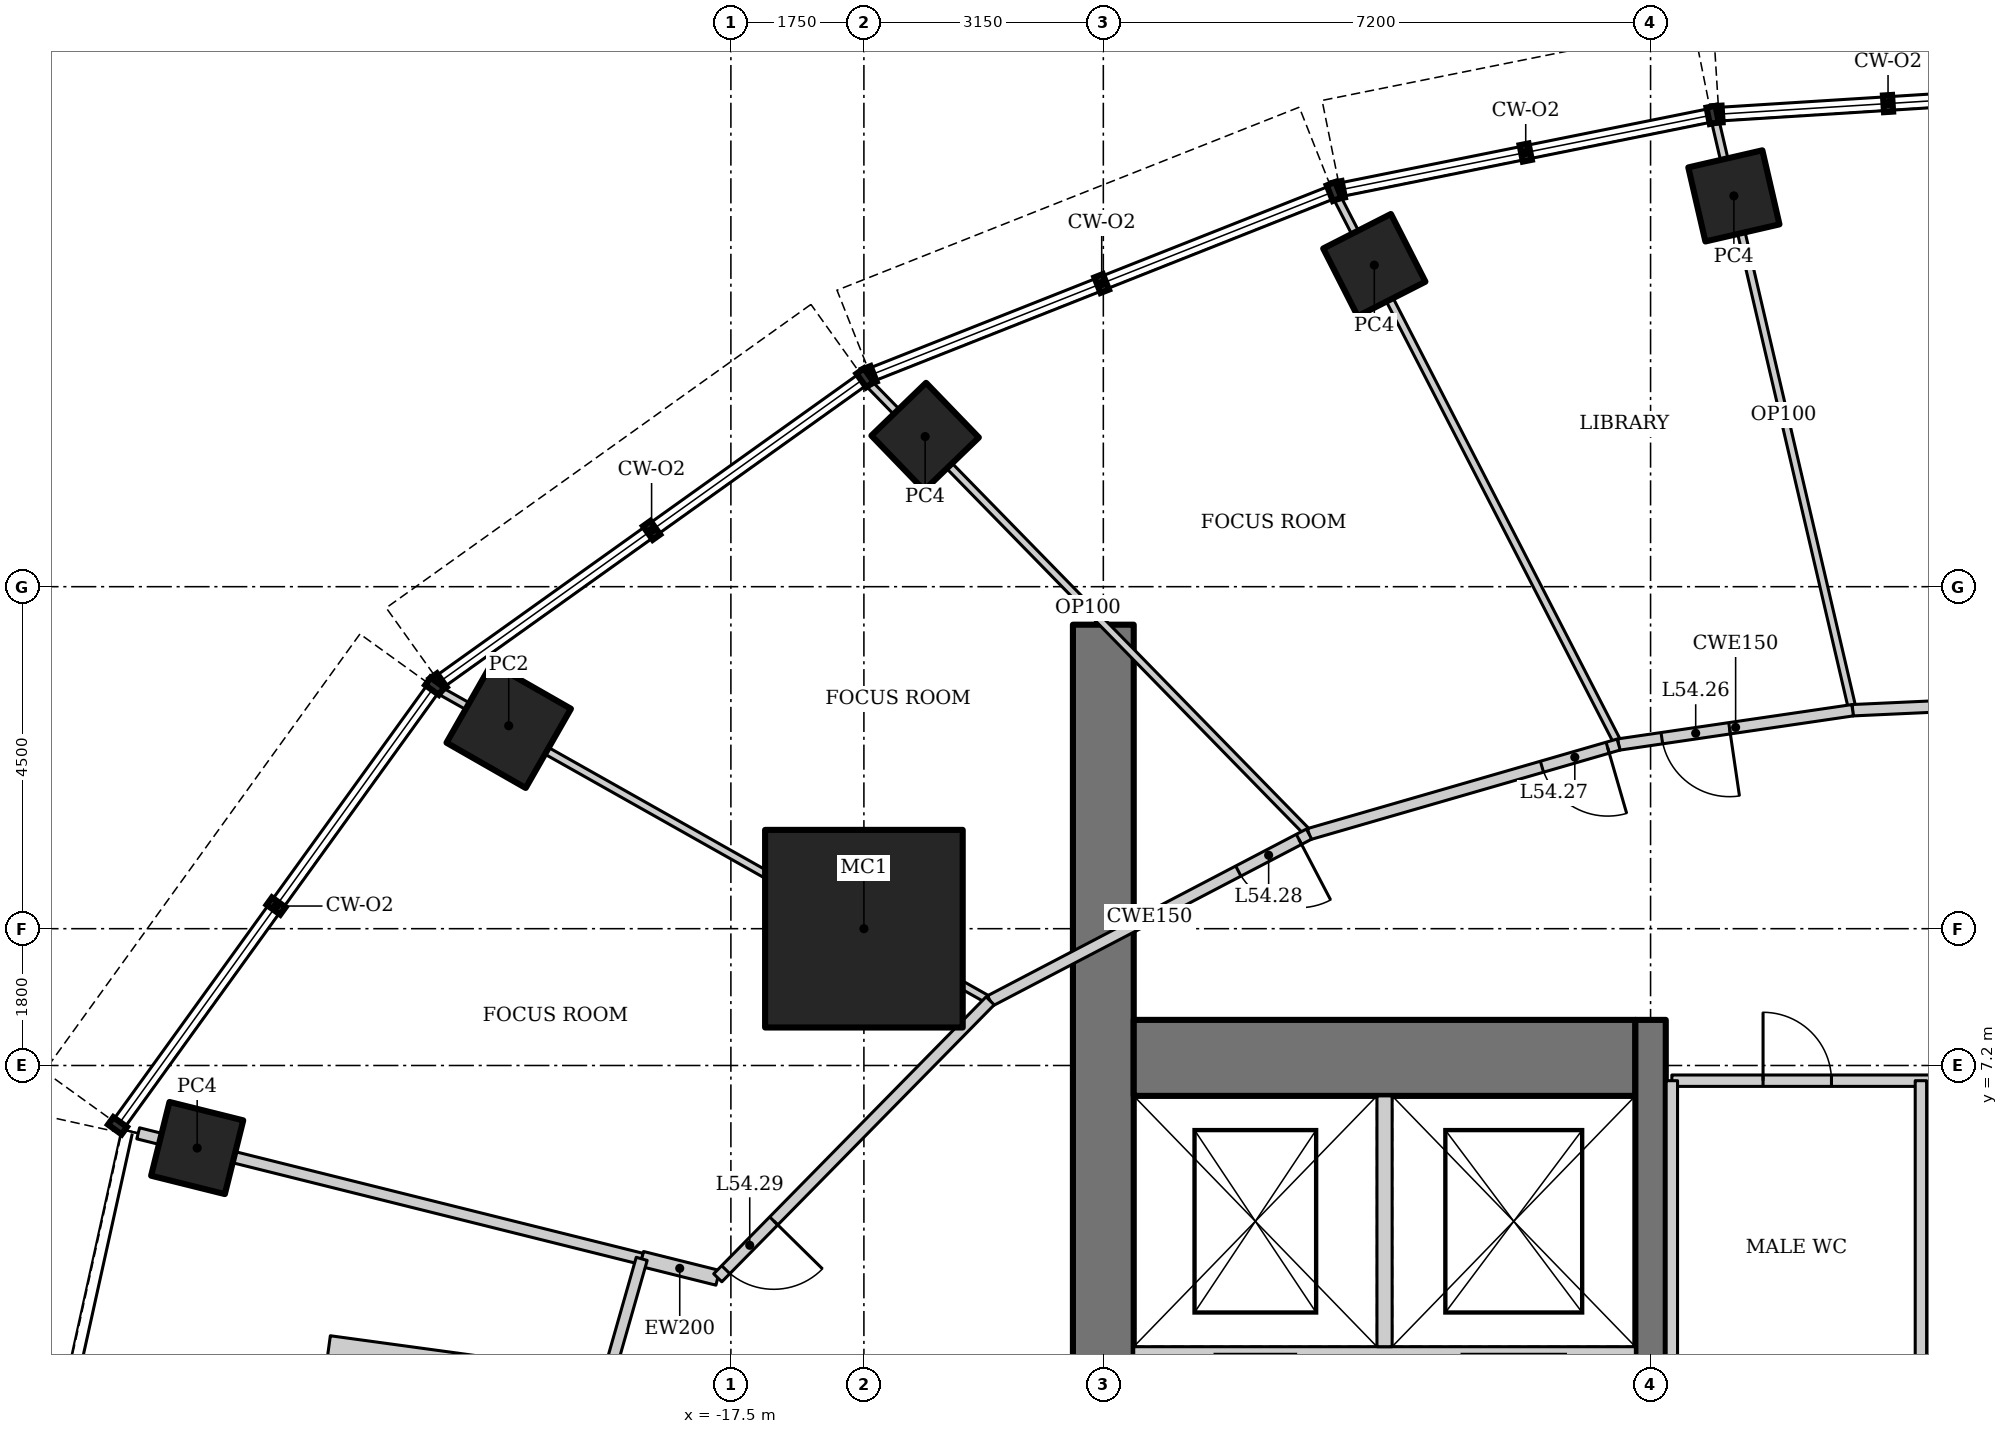
"""IFC4 building model, lengths in metres.
Left out: names, types, materials, properties, quantities, classifications, styles, units other than length and angle.
Written with IfcOpenShell. Run it as: python <this file> out.ifc"""

import sys

from ifc_helpers import new_model, si_unit, direction, frame, frame_2d, origin, origin_2d, place, context, subcontext, project, spatial, rectangle, hollow_rectangle, extrude, element, fill, save


model = new_model("IFC4")
c1 = context("Model", 3, precision=1e-05, world=origin(), true_north=direction((0.0, 1.0)))
c2 = subcontext(c1, "Body", "Model", "MODEL_VIEW")
j1 = project(units=[si_unit("LENGTHUNIT", "METRE"), si_unit("PLANEANGLEUNIT", "RADIAN")], contexts=[c1])
p1 = place(None, origin())
s1 = spatial("IfcSite", under=j1, at=p1, CompositionType="ELEMENT")
p2 = place(p1, origin())
s2 = spatial("IfcBuilding", under=s1, at=p2, CompositionType="ELEMENT")
p3 = place(p2, frame((0.0, 0.0, 232.6)))
s3 = spatial("IfcBuildingStorey", under=s2, at=p3, CompositionType="ELEMENT", Elevation=232.6)
p4 = place(p3, frame((-15.75, 9.0, 0.0), z_axis=(0.0, 0.0, 1.0), x_axis=(1.0, 0.0, 0.0)))
e1 = element("IfcColumn", 1, at=p4, inside=s3, PredefinedType="COLUMN", context=c2, shape_type="SweptSolid", body=[
    extrude(hollow_rectangle(XDim=2.6, YDim=2.6, WallThickness=0.13, at=origin_2d()), origin(), (0.0, 0.0, 1.0), 4.2),
])
for number, where, z_axis, x_axis in (
    (2, (-4.304, 18.642, 0.0), (0.0, 0.0, 1.0), (0.974, 0.225, 0.0)),
    (3, (-9.035, 17.731, 0.0), (0.0, 0.0, 1.0), (0.891, 0.454, 0.0)),
    (4, (-14.944, 15.475, 0.0), (0.0, 0.0, 1.0), (0.719, 0.695, 0.0)),
):
    element("IfcColumn", number, at=place(p3, frame(where, z_axis=z_axis, x_axis=x_axis)), inside=s3, PredefinedType="COLUMN", context=c2, shape_type="SweptSolid", body=[
        extrude(hollow_rectangle(XDim=1.0, YDim=1.0, WallThickness=0.08, at=origin_2d()), origin(), (0.0, 0.0, 1.0), 4.2),
    ])
p5 = place(p3, frame((-20.423, 11.67, 0.0), z_axis=(0.0, 0.0, 1.0), x_axis=(0.496139221777, 0.86824298017, 0.0)))
e5 = element("IfcColumn", 5, at=p5, inside=s3, PredefinedType="COLUMN", context=c2, shape_type="SweptSolid", body=[
    extrude(hollow_rectangle(XDim=1.2, YDim=1.2, WallThickness=0.1, at=origin_2d()), origin(), (0.0, 0.0, 1.0), 4.2),
])
p6 = place(p3, frame((-24.522, 6.114, 0.0), z_axis=(0.0, 0.0, 1.0), x_axis=(0.2419218956, 0.970295726276, 0.0)))
e6 = element("IfcColumn", 6, at=p6, inside=s3, PredefinedType="COLUMN", context=c2, shape_type="SweptSolid", body=[
    extrude(hollow_rectangle(XDim=1.0, YDim=1.0, WallThickness=0.08, at=origin_2d()), origin(), (0.0, 0.0, 1.0), 4.2),
])
p7 = place(p3, frame((-12.6, 13.0, 0.0), z_axis=(0.0, 0.0, 1.0), x_axis=(0.0, -1.0, 0.0)))
e7 = element("IfcWall", 7, at=p7, inside=s3, PredefinedType="SHEAR", context=c2, shape_type="SweptSolid", body=[
    extrude(rectangle(XDim=26.0, YDim=0.8, at=frame_2d((13.0, 0.0))), origin(), (0.0, 0.0, 1.0), 4.2),
])
p8 = place(p7, frame((12.1, 0.0, 0.0)))
e8 = element("IfcOpeningElement", 8, at=p8, cuts=e7, PredefinedType="OPENING", context=c2, shape_type="SweptSolid", body=[
    extrude(rectangle(XDim=1.8, YDim=2.1, at=frame_2d((0.9, 1.05))), frame((0.0, 0.41, 0.0), z_axis=(0.0, -1.0, 0.0), x_axis=(1.0, 0.0, 0.0)), (0.0, 0.0, 1.0), 0.82),
])
p9 = place(p3, frame((-5.6, 7.3, 0.0), z_axis=(0.0, 0.0, 1.0), x_axis=(-1.0, 0.0, 0.0)))
e9 = element("IfcWall", 9, at=p9, inside=s3, PredefinedType="SHEAR", context=c2, shape_type="SweptSolid", body=[
    extrude(rectangle(XDim=6.6, YDim=1.0, at=frame_2d((3.3, 0.0))), origin(), (0.0, 0.0, 1.0), 4.2),
])
p10 = place(p3, frame((-5.4, 7.8, 0.0), z_axis=(0.0, 0.0, 1.0), x_axis=(0.0, -1.0, 0.0)))
e10 = element("IfcWall", 10, at=p10, inside=s3, PredefinedType="SHEAR", context=c2, shape_type="SweptSolid", body=[
    extrude(rectangle(XDim=14.6, YDim=0.4, at=frame_2d((7.3, 0.0))), origin(), (0.0, 0.0, 1.0), 4.2),
])
p11 = place(p10, frame((6.4, 0.0, 0.0)))
e11 = element("IfcOpeningElement", 11, at=p11, cuts=e10, PredefinedType="OPENING", context=c2, shape_type="SweptSolid", body=[
    extrude(rectangle(XDim=1.8, YDim=2.1, at=frame_2d((0.9, 1.05))), frame((0.0, 0.21, 0.0), z_axis=(0.0, -1.0, 0.0), x_axis=(1.0, 0.0, 0.0)), (0.0, 0.0, 1.0), 0.42),
])
p12 = place(p3, frame((-12.2, 3.4, 0.0), z_axis=(0.0, 0.0, 1.0), x_axis=(1.0, 0.0, 0.0)))
e12 = element("IfcWall", 12, at=p12, inside=s3, PredefinedType="SOLIDWALL", context=c2, shape_type="SweptSolid", body=[
    extrude(rectangle(XDim=6.6, YDim=0.2, at=frame_2d((3.3, 0.0))), origin(), (0.0, 0.0, 1.0), 4.2),
])
p13 = place(p12, frame((1.05, 0.0, 0.0)))
e13 = element("IfcOpeningElement", 13, at=p13, cuts=e12, PredefinedType="OPENING", context=c2, shape_type="SweptSolid", body=[
    extrude(rectangle(XDim=1.1, YDim=2.2, at=frame_2d((0.55, 1.1))), frame((0.0, 0.11, 0.0), z_axis=(0.0, -1.0, 0.0), x_axis=(1.0, 0.0, 0.0)), (0.0, 0.0, 1.0), 0.22),
])
p14 = place(p12, frame((4.3, 0.0, 0.0)))
e14 = element("IfcOpeningElement", 14, at=p14, cuts=e12, PredefinedType="OPENING", context=c2, shape_type="SweptSolid", body=[
    extrude(rectangle(XDim=1.4, YDim=2.2, at=frame_2d((0.7, 1.1))), frame((0.0, 0.11, 0.0), z_axis=(0.0, -1.0, 0.0), x_axis=(1.0, 0.0, 0.0)), (0.0, 0.0, 1.0), 0.22),
])
p15 = place(p3, frame((-8.9, 3.5, 0.0), z_axis=(0.0, 0.0, 1.0), x_axis=(0.0, 1.0, 0.0)))
e15 = element("IfcWall", 15, at=p15, inside=s3, PredefinedType="SOLIDWALL", context=c2, shape_type="SweptSolid", body=[
    extrude(rectangle(XDim=3.3, YDim=0.2, at=frame_2d((1.65, 0.0))), origin(), (0.0, 0.0, 1.0), 4.2),
])
p16 = place(p3, frame((-20.941, 2.789, 0.0), z_axis=(0.0, 0.0, 1.0), x_axis=(-0.990807029325, 0.135282780276, 0.0)))
e16 = element("IfcWall", 16, at=p16, inside=s3, PredefinedType="USERDEFINED", context=c2, shape_type="SweptSolid", body=[
    extrude(rectangle(XDim=1.927, YDim=1.2, at=frame_2d((0.964, 0.0))), origin(), (0.0, 0.0, 1.0), 0.9),
])
p17 = place(p3, frame((-18.673, 4.656, 0.0), z_axis=(0.0, 0.0, 1.0), x_axis=(-0.970293751158, 0.241929817229, 0.0)))
e17 = element("IfcWall", 17, at=p17, inside=s3, PredefinedType="ELEMENTEDWALL", context=c2, shape_type="SweptSolid", body=[
    extrude(rectangle(XDim=6.828, YDim=0.15, at=frame_2d((3.414, 0.0))), origin(), (0.0, 0.0, 1.0), 3.108),
])
p18 = place(p3, frame((-4.556, 19.657, 0.0), z_axis=(0.0, 0.0, 1.0), x_axis=(0.227034513848, -0.973886712879, 0.0)))
e18 = element("IfcWall", 18, at=p18, inside=s3, PredefinedType="PARTITIONING", context=c2, shape_type="SweptSolid", body=[
    extrude(rectangle(XDim=7.991, YDim=0.1, at=frame_2d((3.996, 0.0))), origin(), (0.0, 0.0, 1.0), 3.108),
])
p19 = place(p3, frame((-9.539, 18.65, 0.0), z_axis=(0.0, 0.0, 1.0), x_axis=(0.457552286462, -0.88918271753, 0.0)))
e19 = element("IfcWall", 19, at=p19, inside=s3, PredefinedType="PARTITIONING", context=c2, shape_type="SweptSolid", body=[
    extrude(rectangle(XDim=8.128, YDim=0.1, at=frame_2d((4.064, 0.0))), origin(), (0.0, 0.0, 1.0), 3.108),
])
p20 = place(p3, frame((-15.709, 16.199, 0.0), z_axis=(0.0, 0.0, 1.0), x_axis=(0.69875697861, -0.715359129978, 0.0)))
e20 = element("IfcWall", 20, at=p20, inside=s3, PredefinedType="PARTITIONING", context=c2, shape_type="SweptSolid", body=[
    extrude(rectangle(XDim=8.323, YDim=0.1, at=frame_2d((4.162, 0.0))), origin(), (0.0, 0.0, 1.0), 3.41),
])
p21 = place(p3, frame((-21.358, 12.15, 0.0), z_axis=(0.0, 0.0, 1.0), x_axis=(0.871080529249, -0.491140215786, 0.0)))
e21 = element("IfcWall", 21, at=p21, inside=s3, PredefinedType="PARTITIONING", context=c2, shape_type="SweptSolid", body=[
    extrude(rectangle(XDim=8.345, YDim=0.1, at=frame_2d((4.173, 0.0))), origin(), (0.0, 0.0, 1.0), 3.524),
])
p22 = place(p3, frame((-18.673, 4.656, 0.0), z_axis=(0.0, 0.0, 1.0), x_axis=(0.970281616392, -0.241978480223, 0.0)))
e22 = element("IfcWall", 22, at=p22, inside=s3, PredefinedType="SOLIDWALL", context=c2, shape_type="SweptSolid", body=[
    extrude(rectangle(XDim=1.031, YDim=0.2, at=frame_2d((0.516, 0.0))), origin(), (0.0, 0.0, 1.0), 3.108),
])
p23 = place(p3, frame((0.0, 12.0, 0.0), z_axis=(0.0, 0.0, 1.0), x_axis=(-0.998953998629, -0.045726454297, 0.0)))
e23 = element("IfcWall", 23, at=p23, inside=s3, PredefinedType="PARTITIONING", context=c2, shape_type="SweptSolid", body=[
    extrude(rectangle(XDim=2.744, YDim=0.15, at=frame_2d((1.372, 0.0))), origin(), (0.0, 0.0, 1.0), 4.05),
])
p24 = place(p3, frame((-2.741, 11.875, 0.0), z_axis=(0.0, 0.0, 1.0), x_axis=(-0.989421822189, -0.145067080265, 0.0)))
e24 = element("IfcWall", 24, at=p24, inside=s3, PredefinedType="PARTITIONING", context=c2, shape_type="SweptSolid", body=[
    extrude(rectangle(XDim=3.112, YDim=0.15, at=frame_2d((1.556, 0.0))), origin(), (0.0, 0.0, 1.0), 4.05),
])
p25 = place(p24, frame((1.637, 0.0, 0.0)))
e25 = element("IfcOpeningElement", 25, at=p25, cuts=e24, PredefinedType="OPENING", context=c2, shape_type="SweptSolid", body=[
    extrude(rectangle(XDim=0.9, YDim=2.1, at=frame_2d((0.45, 1.05))), frame((0.0, 0.085, 0.0), z_axis=(0.0, -1.0, 0.0), x_axis=(1.0, 0.0, 0.0)), (0.0, 0.0, 1.0), 0.17),
])
p26 = place(p3, frame((-5.82, 11.423, 0.0), z_axis=(0.0, 0.0, 1.0), x_axis=(-0.960614838378, -0.27788330696, 0.0)))
e26 = element("IfcWall", 26, at=p26, inside=s3, PredefinedType="PARTITIONING", context=c2, shape_type="SweptSolid", body=[
    extrude(rectangle(XDim=4.24, YDim=0.15, at=frame_2d((2.12, 0.0))), origin(), (0.0, 0.0, 1.0), 4.05),
])
p27 = place(p26, frame((0.15, 0.0, 0.0)))
e27 = element("IfcOpeningElement", 27, at=p27, cuts=e26, PredefinedType="OPENING", context=c2, shape_type="SweptSolid", body=[
    extrude(rectangle(XDim=0.9, YDim=2.1, at=frame_2d((0.45, 1.05))), frame((0.0, 0.085, 0.0), z_axis=(0.0, -1.0, 0.0), x_axis=(1.0, 0.0, 0.0)), (0.0, 0.0, 1.0), 0.17),
])
p28 = place(p3, frame((-9.893, 10.245, 0.0), z_axis=(0.0, 0.0, 1.0), x_axis=(-0.886174439647, -0.463351769735, 0.0)))
e28 = element("IfcWall", 28, at=p28, inside=s3, PredefinedType="PARTITIONING", context=c2, shape_type="SweptSolid", body=[
    extrude(rectangle(XDim=4.735, YDim=0.15, at=frame_2d((2.367, 0.0))), origin(), (0.0, 0.0, 1.0), 4.05),
])
p29 = place(p28, frame((0.15, 0.0, 0.0)))
e29 = element("IfcOpeningElement", 29, at=p29, cuts=e28, PredefinedType="OPENING", context=c2, shape_type="SweptSolid", body=[
    extrude(rectangle(XDim=0.9, YDim=2.1, at=frame_2d((0.45, 1.05))), frame((0.0, 0.085, 0.0), z_axis=(0.0, -1.0, 0.0), x_axis=(1.0, 0.0, 0.0)), (0.0, 0.0, 1.0), 0.17),
])
p30 = place(p3, frame((-14.089, 8.051, 0.0), z_axis=(0.0, 0.0, 1.0), x_axis=(-0.701111216625, -0.713051934941, 0.0)))
e30 = element("IfcWall", 30, at=p30, inside=s3, PredefinedType="PARTITIONING", context=c2, shape_type="SweptSolid", body=[
    extrude(rectangle(XDim=5.112, YDim=0.15, at=frame_2d((2.556, 0.0))), origin(), (0.0, 0.0, 1.0), 4.05),
])
p31 = place(p30, frame((4.061, 0.0, 0.0)))
e31 = element("IfcOpeningElement", 31, at=p31, cuts=e30, PredefinedType="OPENING", context=c2, shape_type="SweptSolid", body=[
    extrude(rectangle(XDim=0.9, YDim=2.1, at=frame_2d((0.45, 1.05))), frame((0.0, 0.085, 0.0), z_axis=(0.0, -1.0, 0.0), x_axis=(1.0, 0.0, 0.0)), (0.0, 0.0, 1.0), 0.17),
])
p32 = place(p3, frame((-5.12, 7.0, 0.0), z_axis=(0.0, 0.0, 1.0), x_axis=(1.0, 0.0, 0.0)))
e32 = element("IfcWall", 32, at=p32, inside=s3, PredefinedType="SOLIDWALL", context=c2, shape_type="SweptSolid", body=[
    extrude(rectangle(XDim=10.24, YDim=0.15, at=frame_2d((5.12, 0.0))), origin(), (0.0, 0.0, 1.0), 4.05),
])
p33 = place(p32, frame((1.2, 0.0, 0.0)))
e33 = element("IfcOpeningElement", 33, at=p33, cuts=e32, PredefinedType="OPENING", context=c2, shape_type="SweptSolid", body=[
    extrude(rectangle(XDim=0.9, YDim=2.1, at=frame_2d((0.45, 1.05))), frame((0.0, 0.085, 0.0), z_axis=(0.0, -1.0, 0.0), x_axis=(1.0, 0.0, 0.0)), (0.0, 0.0, 1.0), 0.17),
])
p34 = place(p32, frame((4.477, 0.0, 0.0)))
e34 = element("IfcOpeningElement", 34, at=p34, cuts=e32, PredefinedType="OPENING", context=c2, shape_type="SweptSolid", body=[
    extrude(rectangle(XDim=0.9, YDim=2.1, at=frame_2d((0.45, 1.05))), frame((0.0, 0.085, 0.0), z_axis=(0.0, -1.0, 0.0), x_axis=(1.0, 0.0, 0.0)), (0.0, 0.0, 1.0), 0.17),
])
p35 = place(p32, frame((7.054, 0.0, 0.0)))
e35 = element("IfcOpeningElement", 35, at=p35, cuts=e32, PredefinedType="OPENING", context=c2, shape_type="SweptSolid", body=[
    extrude(rectangle(XDim=1.0, YDim=2.1, at=frame_2d((0.5, 1.05))), frame((0.0, 0.085, 0.0), z_axis=(0.0, -1.0, 0.0), x_axis=(1.0, 0.0, 0.0)), (0.0, 0.0, 1.0), 0.17),
])
p36 = place(p32, frame((8.952, 0.0, 0.0)))
e36 = element("IfcOpeningElement", 36, at=p36, cuts=e32, PredefinedType="OPENING", context=c2, shape_type="SweptSolid", body=[
    extrude(rectangle(XDim=0.9, YDim=2.1, at=frame_2d((0.45, 1.05))), frame((0.0, 0.085, 0.0), z_axis=(0.0, -1.0, 0.0), x_axis=(1.0, 0.0, 0.0)), (0.0, 0.0, 1.0), 0.17),
])
for number, where, z_axis, x_axis in (
    (37, (-5.12, 2.6, 0.0), (0.0, 0.0, 1.0), (0.0, 1.0, 0.0)),
    (38, (-1.843, 2.6, 0.0), (0.0, 0.0, 1.0), (0.0, 1.0, 0.0)),
):
    element("IfcWall", number, at=place(p3, frame(where, z_axis=z_axis, x_axis=x_axis)), inside=s3, PredefinedType="SOLIDWALL", context=c2, shape_type="SweptSolid", body=[
        extrude(rectangle(XDim=4.4, YDim=0.15, at=frame_2d((2.2, 0.0))), origin(), (0.0, 0.0, 1.0), 4.05),
    ])
p37 = place(p3, frame((-18.673, 4.656, 0.0), z_axis=(0.0, 0.0, 1.0), x_axis=(-0.274041669067, -0.961717819121, 0.0)))
e39 = element("IfcWall", 39, at=p37, inside=s3, PredefinedType="ELEMENTEDWALL", context=c2, shape_type="SweptSolid", body=[
    extrude(rectangle(XDim=4.841, YDim=0.15, at=frame_2d((2.42, 0.0))), origin(), (0.0, 0.0, 1.0), 4.05),
])
p38 = place(p37, frame((1.421, 0.0, 0.0)))
e40 = element("IfcOpeningElement", 40, at=p38, cuts=e39, PredefinedType="OPENING", context=c2, shape_type="SweptSolid", body=[
    extrude(rectangle(XDim=1.8, YDim=2.1, at=frame_2d((0.9, 1.05))), frame((0.0, 0.085, 0.0), z_axis=(0.0, -1.0, 0.0), x_axis=(1.0, 0.0, 0.0)), (0.0, 0.0, 1.0), 0.17),
])
p39 = place(p13, origin())
e41 = element("IfcDoor", 41, at=p39, inside=s3, OperationType="DOUBLE_DOOR_SLIDING", PredefinedType="DOOR", context=c2, shape_type="SweptSolid", body=[
    extrude(rectangle(XDim=1.1, YDim=2.2, at=frame_2d((0.55, 1.1))), frame((0.0, 0.025, 0.0), z_axis=(0.0, -1.0, 0.0), x_axis=(1.0, 0.0, 0.0)), (0.0, 0.0, 1.0), 0.05),
])
fill(e13, e41)
p40 = place(p14, origin())
e42 = element("IfcDoor", 42, at=p40, inside=s3, OperationType="DOUBLE_DOOR_SLIDING", PredefinedType="DOOR", context=c2, shape_type="SweptSolid", body=[
    extrude(rectangle(XDim=1.4, YDim=2.2, at=frame_2d((0.7, 1.1))), frame((0.0, 0.025, 0.0), z_axis=(0.0, -1.0, 0.0), x_axis=(1.0, 0.0, 0.0)), (0.0, 0.0, 1.0), 0.05),
])
fill(e14, e42)
p41 = place(p33, origin())
e43 = element("IfcDoor", 43, at=p41, inside=s3, OperationType="SINGLE_SWING_LEFT", PredefinedType="DOOR", context=c2, shape_type="SweptSolid", body=[
    extrude(rectangle(XDim=0.9, YDim=2.1, at=frame_2d((0.45, 1.05))), frame((0.0, 0.025, 0.0), z_axis=(0.0, -1.0, 0.0), x_axis=(1.0, 0.0, 0.0)), (0.0, 0.0, 1.0), 0.05),
])
fill(e33, e43)
p42 = place(p25, origin())
e44 = element("IfcDoor", 44, at=p42, inside=s3, OperationType="SINGLE_SWING_LEFT", PredefinedType="DOOR", context=c2, shape_type="SweptSolid", body=[
    extrude(rectangle(XDim=0.9, YDim=2.1, at=frame_2d((0.45, 1.05))), frame((0.0, 0.025, 0.0), z_axis=(0.0, -1.0, 0.0), x_axis=(1.0, 0.0, 0.0)), (0.0, 0.0, 1.0), 0.05),
])
fill(e25, e44)
p43 = place(p27, origin())
e45 = element("IfcDoor", 45, at=p43, inside=s3, OperationType="SINGLE_SWING_LEFT", PredefinedType="DOOR", context=c2, shape_type="SweptSolid", body=[
    extrude(rectangle(XDim=0.9, YDim=2.1, at=frame_2d((0.45, 1.05))), frame((0.0, 0.025, 0.0), z_axis=(0.0, -1.0, 0.0), x_axis=(1.0, 0.0, 0.0)), (0.0, 0.0, 1.0), 0.05),
])
fill(e27, e45)
p44 = place(p29, origin())
e46 = element("IfcDoor", 46, at=p44, inside=s3, OperationType="SINGLE_SWING_LEFT", PredefinedType="DOOR", context=c2, shape_type="SweptSolid", body=[
    extrude(rectangle(XDim=0.9, YDim=2.1, at=frame_2d((0.45, 1.05))), frame((0.0, 0.025, 0.0), z_axis=(0.0, -1.0, 0.0), x_axis=(1.0, 0.0, 0.0)), (0.0, 0.0, 1.0), 0.05),
])
fill(e29, e46)
p45 = place(p31, origin())
e47 = element("IfcDoor", 47, at=p45, inside=s3, OperationType="SINGLE_SWING_LEFT", PredefinedType="DOOR", context=c2, shape_type="SweptSolid", body=[
    extrude(rectangle(XDim=0.9, YDim=2.1, at=frame_2d((0.45, 1.05))), frame((0.0, 0.025, 0.0), z_axis=(0.0, -1.0, 0.0), x_axis=(1.0, 0.0, 0.0)), (0.0, 0.0, 1.0), 0.05),
])
fill(e31, e47)
save(model, sys.argv[1])
